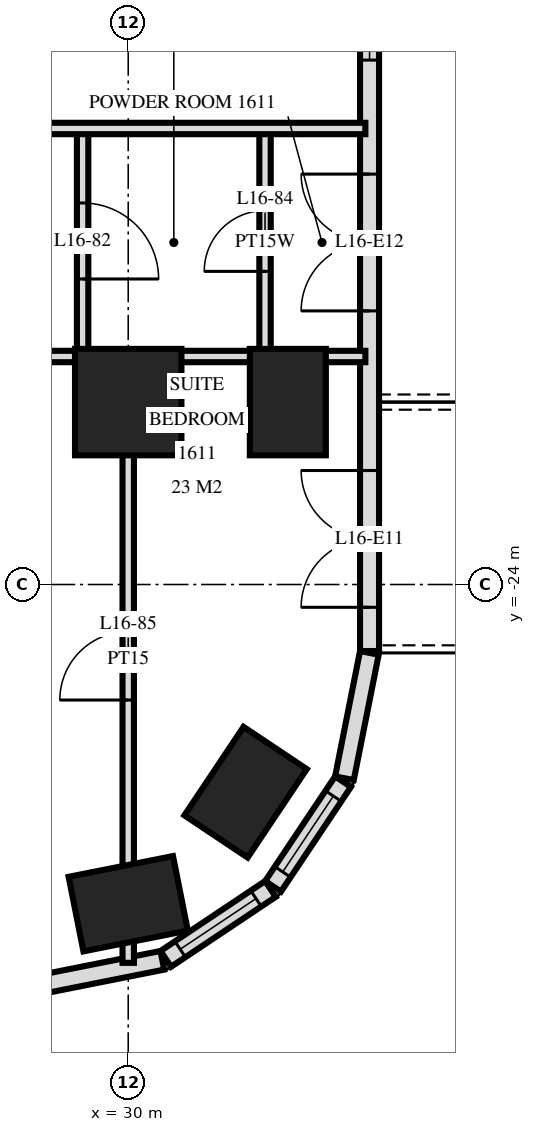
"""IFC4 building model, lengths in metres.
Left out: names, types, materials, properties, quantities, classifications, styles, units other than length and angle.
Written with IfcOpenShell. Run it as: python <this file> out.ifc"""

import sys

from ifc_helpers import new_model, si_unit, direction, frame, frame_2d, origin, origin_2d, place, context, subcontext, project, spatial, rectangle, extrude, element, fill, save


model = new_model("IFC4")
c1 = context("Model", 3, precision=1e-05, world=origin(), true_north=direction((0.0, 1.0)))
c2 = subcontext(c1, "Body", "Model", "MODEL_VIEW")
j1 = project(units=[si_unit("LENGTHUNIT", "METRE"), si_unit("PLANEANGLEUNIT", "RADIAN")], contexts=[c1])
p1 = place(None, origin())
s1 = spatial("IfcSite", under=j1, at=p1, CompositionType="ELEMENT")
p2 = place(p1, origin())
s2 = spatial("IfcBuilding", under=s1, at=p2, CompositionType="ELEMENT")
p3 = place(p2, frame((0.0, 0.0, 67.2)))
s3 = spatial("IfcBuildingStorey", under=s2, at=p3, CompositionType="ELEMENT", Elevation=67.2)
p4 = place(p3, frame((30.0, -28.2, 0.0), z_axis=(0.0, 0.0, 1.0), x_axis=(0.980792089743, 0.195056086032, 0.0)))
e1 = element("IfcColumn", 1, at=p4, inside=s3, PredefinedType="COLUMN", context=c2, shape_type="SweptSolid", body=[
    extrude(rectangle(XDim=1.4, YDim=1.0, at=origin_2d()), origin(), (0.0, 0.0, 1.0), 3.6),
])
p5 = place(p3, frame((30.0, -21.6, 0.0), z_axis=(0.0, 0.0, 1.0), x_axis=(1.0, 0.0, 0.0)))
e2 = element("IfcColumn", 2, at=p5, inside=s3, PredefinedType="COLUMN", context=c2, shape_type="SweptSolid", body=[
    extrude(rectangle(XDim=1.4, YDim=1.4, at=origin_2d()), origin(), (0.0, 0.0, 1.0), 3.6),
])
for number, where, z_axis, x_axis in (
    (3, (31.544, -26.733, 0.0), (0.0, 0.0, 1.0), (0.556, 0.831, 0.0)),
    (4, (32.1, -21.6, 0.0), (0.0, 0.0, 1.0), (0.0, 1.0, 0.0)),
):
    element("IfcColumn", number, at=place(p3, frame(where, z_axis=z_axis, x_axis=x_axis)), inside=s3, PredefinedType="COLUMN", context=c2, shape_type="SweptSolid", body=[
        extrude(rectangle(XDim=1.4, YDim=1.0, at=origin_2d()), origin(), (0.0, 0.0, 1.0), 3.6),
    ])
p6 = place(p3, frame((28.8, -29.273, 0.0), z_axis=(0.0, 0.0, 1.0), x_axis=(0.980775640221, 0.19513878023, 0.0)))
e5 = element("IfcWall", 5, at=p6, inside=s3, PredefinedType="SOLIDWALL", context=c2, shape_type="SweptSolid", body=[
    extrude(rectangle(XDim=1.681, YDim=0.25, at=frame_2d((0.841, 0.0))), origin(), (0.0, 0.0, 1.0), 3.32),
])
p7 = place(p3, frame((30.494, -28.926, 0.0), z_axis=(0.0, 0.0, 1.0), x_axis=(0.831482937015, 0.55555029066, 0.0)))
e6 = element("IfcWall", 6, at=p7, inside=s3, PredefinedType="SOLIDWALL", context=c2, shape_type="SweptSolid", body=[
    extrude(rectangle(XDim=1.656, YDim=0.25, at=frame_2d((0.828, 0.0))), origin(), (0.0, 0.0, 1.0), 3.32),
])
p8 = place(p7, frame((0.228, 0.0, 0.9)))
e7 = element("IfcOpeningElement", 7, at=p8, cuts=e6, PredefinedType="OPENING", context=c2, shape_type="SweptSolid", body=[
    extrude(rectangle(XDim=1.2, YDim=1.5, at=frame_2d((0.6, 0.75))), frame((0.0, 0.135, 0.0), z_axis=(0.0, -1.0, 0.0), x_axis=(1.0, 0.0, 0.0)), (0.0, 0.0, 1.0), 0.27),
])
p9 = place(p3, frame((31.906, -27.971, 0.0), z_axis=(0.0, 0.0, 1.0), x_axis=(0.55555029066, 0.831482937015, 0.0)))
e8 = element("IfcWall", 8, at=p9, inside=s3, PredefinedType="SOLIDWALL", context=c2, shape_type="SweptSolid", body=[
    extrude(rectangle(XDim=1.656, YDim=0.25, at=frame_2d((0.828, 0.0))), origin(), (0.0, 0.0, 1.0), 3.32),
])
p10 = place(p9, frame((0.228, 0.0, 0.9)))
e9 = element("IfcOpeningElement", 9, at=p10, cuts=e8, PredefinedType="OPENING", context=c2, shape_type="SweptSolid", body=[
    extrude(rectangle(XDim=1.2, YDim=1.5, at=frame_2d((0.6, 0.75))), frame((0.0, 0.135, 0.0), z_axis=(0.0, -1.0, 0.0), x_axis=(1.0, 0.0, 0.0)), (0.0, 0.0, 1.0), 0.27),
])
p11 = place(p3, frame((32.844, -26.549, 0.0), z_axis=(0.0, 0.0, 1.0), x_axis=(0.195166572128, 0.980770110232, 0.0)))
e10 = element("IfcWall", 10, at=p11, inside=s3, PredefinedType="SOLIDWALL", context=c2, shape_type="SweptSolid", body=[
    extrude(rectangle(XDim=1.681, YDim=0.25, at=frame_2d((0.841, 0.0))), origin(), (0.0, 0.0, 1.0), 3.32),
])
p12 = place(p3, frame((33.175, -24.875, 0.0), z_axis=(0.0, 0.0, 1.0), x_axis=(0.0, 1.0, 0.0)))
e11 = element("IfcWall", 11, at=p12, inside=s3, PredefinedType="SOLIDWALL", context=c2, shape_type="SweptSolid", body=[
    extrude(rectangle(XDim=21.551, YDim=0.25, at=frame_2d((10.775, 0.0))), origin(), (0.0, 0.0, 1.0), 3.32),
])
p13 = place(p12, frame((0.575, 0.0, 0.0)))
e12 = element("IfcOpeningElement", 12, at=p13, cuts=e11, PredefinedType="OPENING", context=c2, shape_type="SweptSolid", body=[
    extrude(rectangle(XDim=1.8, YDim=2.4, at=frame_2d((0.9, 1.2))), frame((0.0, 0.135, 0.0), z_axis=(0.0, -1.0, 0.0), x_axis=(1.0, 0.0, 0.0)), (0.0, 0.0, 1.0), 0.27),
])
p14 = place(p12, frame((4.475, 0.0, 0.0)))
e13 = element("IfcOpeningElement", 13, at=p14, cuts=e11, PredefinedType="OPENING", context=c2, shape_type="SweptSolid", body=[
    extrude(rectangle(XDim=1.8, YDim=2.4, at=frame_2d((0.9, 1.2))), frame((0.0, 0.135, 0.0), z_axis=(0.0, -1.0, 0.0), x_axis=(1.0, 0.0, 0.0)), (0.0, 0.0, 1.0), 0.27),
])
p15 = place(p12, frame((7.775, 0.0, 0.3)))
e14 = element("IfcOpeningElement", 14, at=p15, cuts=e11, PredefinedType="OPENING", context=c2, shape_type="SweptSolid", body=[
    extrude(rectangle(XDim=1.2, YDim=2.1, at=frame_2d((0.6, 1.05))), frame((0.0, 0.135, 0.0), z_axis=(0.0, -1.0, 0.0), x_axis=(1.0, 0.0, 0.0)), (0.0, 0.0, 1.0), 0.27),
])
p16 = place(p12, frame((13.1, 0.0, 0.0)))
e15 = element("IfcOpeningElement", 15, at=p16, cuts=e11, PredefinedType="OPENING", context=c2, shape_type="SweptSolid", body=[
    extrude(rectangle(XDim=1.8, YDim=2.4, at=frame_2d((0.9, 1.2))), frame((0.0, 0.135, 0.0), z_axis=(0.0, -1.0, 0.0), x_axis=(1.0, 0.0, 0.0)), (0.0, 0.0, 1.0), 0.27),
])
p17 = place(p3, frame((31.8, -21.0, 0.0), z_axis=(0.0, 0.0, 1.0), x_axis=(0.0, 1.0, 0.0)))
e16 = element("IfcWall", 16, at=p17, inside=s3, PredefinedType="PLUMBINGWALL", context=c2, shape_type="SweptSolid", body=[
    extrude(rectangle(XDim=3.0, YDim=0.15, at=frame_2d((1.5, 0.0))), origin(), (0.0, 0.0, 1.0), 3.32),
])
p18 = place(p17, frame((1.12, 0.0, 0.0)))
e17 = element("IfcOpeningElement", 17, at=p18, cuts=e16, PredefinedType="OPENING", context=c2, shape_type="SweptSolid", body=[
    extrude(rectangle(XDim=0.8, YDim=2.1, at=frame_2d((0.4, 1.05))), frame((0.0, 0.085, 0.0), z_axis=(0.0, -1.0, 0.0), x_axis=(1.0, 0.0, 0.0)), (0.0, 0.0, 1.0), 0.17),
])
p19 = place(p3, frame((30.0, -28.978, 0.0), z_axis=(0.0, 0.0, 1.0), x_axis=(0.0, 1.0, 0.0)))
e18 = element("IfcWall", 18, at=p19, inside=s3, PredefinedType="PARTITIONING", context=c2, shape_type="SweptSolid", body=[
    extrude(rectangle(XDim=7.978, YDim=0.15, at=frame_2d((3.989, 0.0))), origin(), (0.0, 0.0, 1.0), 3.32),
])
p20 = place(p19, frame((3.458, 0.0, 0.0)))
e19 = element("IfcOpeningElement", 19, at=p20, cuts=e18, PredefinedType="OPENING", context=c2, shape_type="SweptSolid", body=[
    extrude(rectangle(XDim=0.9, YDim=2.1, at=frame_2d((0.45, 1.05))), frame((0.0, 0.085, 0.0), z_axis=(0.0, -1.0, 0.0), x_axis=(1.0, 0.0, 0.0)), (0.0, 0.0, 1.0), 0.17),
])
p21 = place(p3, frame((29.4, -21.0, 0.0), z_axis=(0.0, 0.0, 1.0), x_axis=(0.0, 1.0, 0.0)))
e20 = element("IfcWall", 20, at=p21, inside=s3, PredefinedType="PARTITIONING", context=c2, shape_type="SweptSolid", body=[
    extrude(rectangle(XDim=3.0, YDim=0.15, at=frame_2d((1.5, 0.0))), origin(), (0.0, 0.0, 1.0), 3.32),
])
p22 = place(p21, frame((1.02, 0.0, 0.0)))
e21 = element("IfcOpeningElement", 21, at=p22, cuts=e20, PredefinedType="OPENING", context=c2, shape_type="SweptSolid", body=[
    extrude(rectangle(XDim=1.0, YDim=2.1, at=frame_2d((0.5, 1.05))), frame((0.0, 0.085, 0.0), z_axis=(0.0, -1.0, 0.0), x_axis=(1.0, 0.0, 0.0)), (0.0, 0.0, 1.0), 0.17),
])
p23 = place(p3, frame((27.0, -21.0, 0.0), z_axis=(0.0, 0.0, 1.0), x_axis=(1.0, 0.0, 0.0)))
e22 = element("IfcWall", 22, at=p23, inside=s3, PredefinedType="PARTITIONING", context=c2, shape_type="SweptSolid", body=[
    extrude(rectangle(XDim=2.4, YDim=0.15, at=frame_2d((1.2, 0.0))), origin(), (0.0, 0.0, 1.0), 3.32),
])
p24 = place(p23, frame((0.68, 0.0, 0.0)))
e23 = element("IfcOpeningElement", 23, at=p24, cuts=e22, PredefinedType="OPENING", context=c2, shape_type="SweptSolid", body=[
    extrude(rectangle(XDim=1.0, YDim=2.1, at=frame_2d((0.5, 1.05))), frame((0.0, 0.085, 0.0), z_axis=(0.0, -1.0, 0.0), x_axis=(1.0, 0.0, 0.0)), (0.0, 0.0, 1.0), 0.17),
])
p25 = place(p3, frame((29.4, -21.0, 0.0), z_axis=(0.0, 0.0, 1.0), x_axis=(1.0, 0.0, 0.0)))
e24 = element("IfcWall", 24, at=p25, inside=s3, PredefinedType="PARTITIONING", context=c2, shape_type="SweptSolid", body=[
    extrude(rectangle(XDim=2.4, YDim=0.15, at=frame_2d((1.2, 0.0))), origin(), (0.0, 0.0, 1.0), 3.32),
])
p26 = place(p3, frame((31.8, -21.0, 0.0), z_axis=(0.0, 0.0, 1.0), x_axis=(1.0, 0.0, 0.0)))
e25 = element("IfcWall", 25, at=p26, inside=s3, PredefinedType="PLUMBINGWALL", context=c2, shape_type="SweptSolid", body=[
    extrude(rectangle(XDim=1.32, YDim=0.15, at=frame_2d((0.66, 0.0))), origin(), (0.0, 0.0, 1.0), 3.32),
])
p27 = place(p3, frame((-33.12, -18.0, 0.0), z_axis=(0.0, 0.0, 1.0), x_axis=(1.0, 0.0, 0.0)))
e26 = element("IfcWall", 26, at=p27, inside=s3, PredefinedType="PARTITIONING", context=c2, shape_type="SweptSolid", body=[
    extrude(rectangle(XDim=66.24, YDim=0.15, at=frame_2d((33.12, 0.0))), origin(), (0.0, 0.0, 1.0), 3.32),
])
p28 = place(p27, frame((15.27, 0.0, 0.0)))
e27 = element("IfcOpeningElement", 27, at=p28, cuts=e26, PredefinedType="OPENING", context=c2, shape_type="SweptSolid", body=[
    extrude(rectangle(XDim=1.0, YDim=2.1, at=frame_2d((0.5, 1.05))), frame((0.0, 0.085, 0.0), z_axis=(0.0, -1.0, 0.0), x_axis=(1.0, 0.0, 0.0)), (0.0, 0.0, 1.0), 0.17),
])
p29 = place(p27, frame((21.22, 0.0, 0.0)))
e28 = element("IfcOpeningElement", 28, at=p29, cuts=e26, PredefinedType="OPENING", context=c2, shape_type="SweptSolid", body=[
    extrude(rectangle(XDim=1.0, YDim=2.1, at=frame_2d((0.5, 1.05))), frame((0.0, 0.085, 0.0), z_axis=(0.0, -1.0, 0.0), x_axis=(1.0, 0.0, 0.0)), (0.0, 0.0, 1.0), 0.17),
])
p30 = place(p27, frame((24.27, 0.0, 0.0)))
e29 = element("IfcOpeningElement", 29, at=p30, cuts=e26, PredefinedType="OPENING", context=c2, shape_type="SweptSolid", body=[
    extrude(rectangle(XDim=1.0, YDim=2.1, at=frame_2d((0.5, 1.05))), frame((0.0, 0.085, 0.0), z_axis=(0.0, -1.0, 0.0), x_axis=(1.0, 0.0, 0.0)), (0.0, 0.0, 1.0), 0.17),
])
p31 = place(p27, frame((30.97, 0.0, 0.0)))
e30 = element("IfcOpeningElement", 30, at=p31, cuts=e26, PredefinedType="OPENING", context=c2, shape_type="SweptSolid", body=[
    extrude(rectangle(XDim=1.0, YDim=2.1, at=frame_2d((0.5, 1.05))), frame((0.0, 0.085, 0.0), z_axis=(0.0, -1.0, 0.0), x_axis=(1.0, 0.0, 0.0)), (0.0, 0.0, 1.0), 0.17),
])
p32 = place(p27, frame((40.42, 0.0, 0.0)))
e31 = element("IfcOpeningElement", 31, at=p32, cuts=e26, PredefinedType="OPENING", context=c2, shape_type="SweptSolid", body=[
    extrude(rectangle(XDim=1.0, YDim=2.1, at=frame_2d((0.5, 1.05))), frame((0.0, 0.085, 0.0), z_axis=(0.0, -1.0, 0.0), x_axis=(1.0, 0.0, 0.0)), (0.0, 0.0, 1.0), 0.17),
])
p33 = place(p27, frame((43.97, 0.0, 0.0)))
e32 = element("IfcOpeningElement", 32, at=p33, cuts=e26, PredefinedType="OPENING", context=c2, shape_type="SweptSolid", body=[
    extrude(rectangle(XDim=1.0, YDim=2.1, at=frame_2d((0.5, 1.05))), frame((0.0, 0.085, 0.0), z_axis=(0.0, -1.0, 0.0), x_axis=(1.0, 0.0, 0.0)), (0.0, 0.0, 1.0), 0.17),
])
p34 = place(p27, frame((45.52, 0.0, 0.0)))
e33 = element("IfcOpeningElement", 33, at=p34, cuts=e26, PredefinedType="OPENING", context=c2, shape_type="SweptSolid", body=[
    extrude(rectangle(XDim=1.0, YDim=2.1, at=frame_2d((0.5, 1.05))), frame((0.0, 0.085, 0.0), z_axis=(0.0, -1.0, 0.0), x_axis=(1.0, 0.0, 0.0)), (0.0, 0.0, 1.0), 0.17),
])
p35 = place(p27, frame((52.97, 0.0, 0.0)))
e34 = element("IfcOpeningElement", 34, at=p35, cuts=e26, PredefinedType="OPENING", context=c2, shape_type="SweptSolid", body=[
    extrude(rectangle(XDim=1.0, YDim=2.1, at=frame_2d((0.5, 1.05))), frame((0.0, 0.085, 0.0), z_axis=(0.0, -1.0, 0.0), x_axis=(1.0, 0.0, 0.0)), (0.0, 0.0, 1.0), 0.17),
])
p36 = place(p27, frame((54.27, 0.0, 0.0)))
e35 = element("IfcOpeningElement", 35, at=p36, cuts=e26, PredefinedType="OPENING", context=c2, shape_type="SweptSolid", body=[
    extrude(rectangle(XDim=1.0, YDim=2.1, at=frame_2d((0.5, 1.05))), frame((0.0, 0.085, 0.0), z_axis=(0.0, -1.0, 0.0), x_axis=(1.0, 0.0, 0.0)), (0.0, 0.0, 1.0), 0.17),
])
p37 = place(p27, frame((13.42, 0.0, 0.0)))
e36 = element("IfcOpeningElement", 36, at=p37, cuts=e26, PredefinedType="OPENING", context=c2, shape_type="SweptSolid", body=[
    extrude(rectangle(XDim=1.0, YDim=2.1, at=frame_2d((0.5, 1.05))), frame((0.0, 0.085, 0.0), z_axis=(0.0, -1.0, 0.0), x_axis=(1.0, 0.0, 0.0)), (0.0, 0.0, 1.0), 0.17),
])
p38 = place(p27, frame((60.82, 0.0, 0.0)))
e37 = element("IfcOpeningElement", 37, at=p38, cuts=e26, PredefinedType="OPENING", context=c2, shape_type="SweptSolid", body=[
    extrude(rectangle(XDim=1.0, YDim=2.1, at=frame_2d((0.5, 1.05))), frame((0.0, 0.085, 0.0), z_axis=(0.0, -1.0, 0.0), x_axis=(1.0, 0.0, 0.0)), (0.0, 0.0, 1.0), 0.17),
])
p39 = place(p8, origin())
e38 = element("IfcWindow", 38, at=p39, inside=s3, PartitioningType="SINGLE_PANEL", PredefinedType="WINDOW", context=c2, shape_type="SweptSolid", body=[
    extrude(rectangle(XDim=1.2, YDim=1.5, at=frame_2d((0.6, 0.75))), frame((0.0, 0.03, 0.0), z_axis=(0.0, -1.0, 0.0), x_axis=(1.0, 0.0, 0.0)), (0.0, 0.0, 1.0), 0.06),
])
fill(e7, e38)
p40 = place(p10, origin())
e39 = element("IfcWindow", 39, at=p40, inside=s3, PartitioningType="SINGLE_PANEL", PredefinedType="WINDOW", context=c2, shape_type="SweptSolid", body=[
    extrude(rectangle(XDim=1.2, YDim=1.5, at=frame_2d((0.6, 0.75))), frame((0.0, 0.03, 0.0), z_axis=(0.0, -1.0, 0.0), x_axis=(1.0, 0.0, 0.0)), (0.0, 0.0, 1.0), 0.06),
])
fill(e9, e39)
p41 = place(p13, origin())
e40 = element("IfcDoor", 40, at=p41, inside=s3, OperationType="DOUBLE_DOOR_SINGLE_SWING", PredefinedType="DOOR", context=c2, shape_type="SweptSolid", body=[
    extrude(rectangle(XDim=1.8, YDim=2.4, at=frame_2d((0.9, 1.2))), frame((0.0, 0.025, 0.0), z_axis=(0.0, -1.0, 0.0), x_axis=(1.0, 0.0, 0.0)), (0.0, 0.0, 1.0), 0.05),
])
fill(e12, e40)
p42 = place(p14, origin())
e41 = element("IfcDoor", 41, at=p42, inside=s3, OperationType="DOUBLE_DOOR_SINGLE_SWING", PredefinedType="DOOR", context=c2, shape_type="SweptSolid", body=[
    extrude(rectangle(XDim=1.8, YDim=2.4, at=frame_2d((0.9, 1.2))), frame((0.0, 0.025, 0.0), z_axis=(0.0, -1.0, 0.0), x_axis=(1.0, 0.0, 0.0)), (0.0, 0.0, 1.0), 0.05),
])
fill(e13, e41)
p43 = place(p15, origin())
e42 = element("IfcWindow", 42, at=p43, inside=s3, PartitioningType="SINGLE_PANEL", PredefinedType="WINDOW", context=c2, shape_type="SweptSolid", body=[
    extrude(rectangle(XDim=1.2, YDim=2.1, at=frame_2d((0.6, 1.05))), frame((0.0, 0.03, 0.0), z_axis=(0.0, -1.0, 0.0), x_axis=(1.0, 0.0, 0.0)), (0.0, 0.0, 1.0), 0.06),
])
fill(e14, e42)
p44 = place(p22, frame((0.5, 0.0, 0.0), z_axis=(0.0, 0.0, 1.0), x_axis=(-1.0, 0.0, 0.0)))
e43 = element("IfcDoor", 43, at=p44, inside=s3, OperationType="SINGLE_SWING_LEFT", PredefinedType="DOOR", context=c2, shape_type="SweptSolid", body=[
    extrude(rectangle(XDim=1.0, YDim=2.1, at=frame_2d((0.0, 1.05))), frame((0.0, -0.025, 0.0), z_axis=(0.0, 1.0, 0.0), x_axis=(-1.0, 0.0, 0.0)), (0.0, 0.0, 1.0), 0.05),
])
fill(e21, e43)
p45 = place(p18, origin())
e44 = element("IfcDoor", 44, at=p45, inside=s3, OperationType="SINGLE_SWING_RIGHT", PredefinedType="DOOR", context=c2, shape_type="SweptSolid", body=[
    extrude(rectangle(XDim=0.8, YDim=2.1, at=frame_2d((0.4, 1.05))), frame((0.0, 0.025, 0.0), z_axis=(0.0, -1.0, 0.0), x_axis=(1.0, 0.0, 0.0)), (0.0, 0.0, 1.0), 0.05),
])
fill(e17, e44)
p46 = place(p20, origin())
e45 = element("IfcDoor", 45, at=p46, inside=s3, OperationType="SINGLE_SWING_RIGHT", PredefinedType="DOOR", context=c2, shape_type="SweptSolid", body=[
    extrude(rectangle(XDim=0.9, YDim=2.1, at=frame_2d((0.45, 1.05))), frame((0.0, 0.025, 0.0), z_axis=(0.0, -1.0, 0.0), x_axis=(1.0, 0.0, 0.0)), (0.0, 0.0, 1.0), 0.05),
])
fill(e19, e45)
save(model, sys.argv[1])
